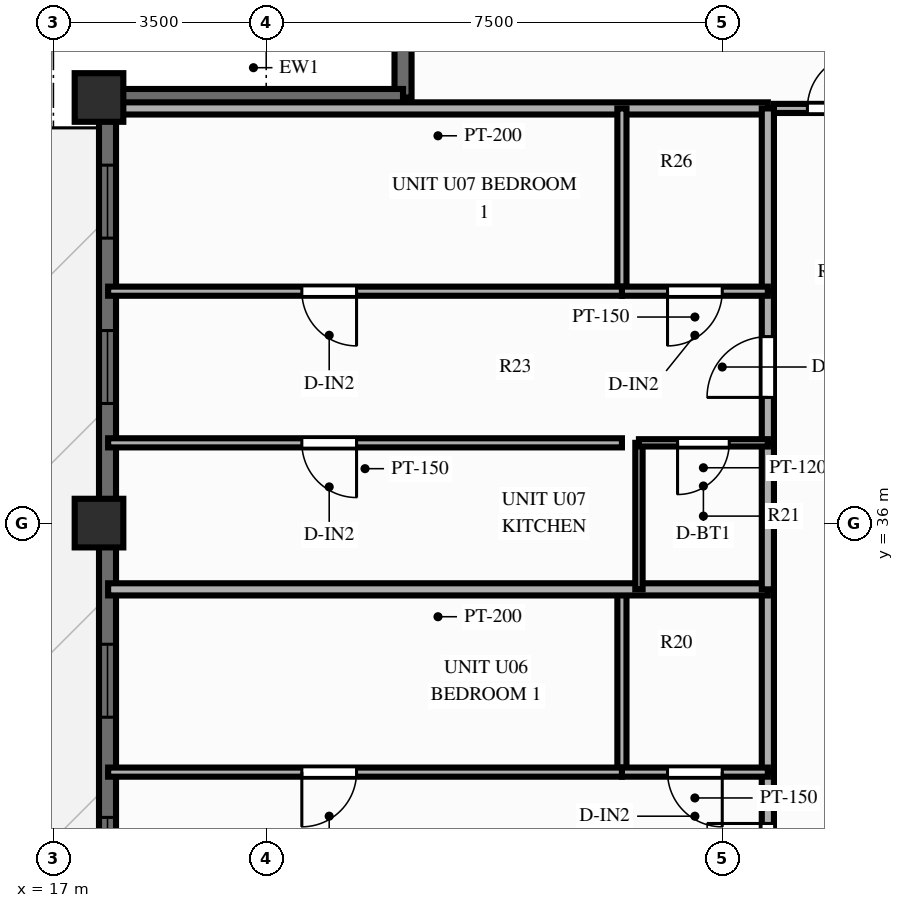
"""IFC4 building model, lengths in metres.
Left out: names, types, materials, properties, quantities, classifications, styles, units other than length and angle.
Written with IfcOpenShell. Run it as: python <this file> out.ifc"""

import sys

from ifc_helpers import new_model, si_unit, direction, frame, frame_2d, origin, origin_2d, place, context, subcontext, project, spatial, rectangle, extrude, source, transform, mapped, element, fill, save


model = new_model("IFC4")
c1 = context("Model", 3, precision=1e-05, world=origin(), true_north=direction((0.0, 1.0)))
c2 = subcontext(c1, "Body", "Model", "MODEL_VIEW")
j1 = project(units=[si_unit("LENGTHUNIT", "METRE"), si_unit("PLANEANGLEUNIT", "RADIAN")], contexts=[c1])
p1 = place(None, origin())
s1 = spatial("IfcSite", under=j1, at=p1, CompositionType="ELEMENT")
p2 = place(p1, origin())
s2 = spatial("IfcBuilding", under=s1, at=p2, CompositionType="ELEMENT")
p3 = place(p2, frame((0.0, 0.0, 192.7)))
s3 = spatial("IfcBuildingStorey", under=s2, at=p3, CompositionType="ELEMENT", Elevation=192.7)
m1 = source(origin(), c2, "Body", "SweptSolid", [
    extrude(rectangle(XDim=0.8, YDim=0.8, at=origin_2d()), origin(), (0.0, 0.0, 1.0), 3.9),
])
for number, where, z_axis, x_axis in (
    (1, (17.75, 43.0, 0.0), (0.0, 0.0, 1.0), (1.0, 0.0, 0.0)),
    (2, (17.75, 36.0, 0.0), (0.0, 0.0, 1.0), (1.0, 0.0, 0.0)),
):
    element("IfcColumn", number, at=place(p3, frame(where, z_axis=z_axis, x_axis=x_axis)), inside=s3, PredefinedType="COLUMN", context=c2, shape_type="MappedRepresentation", body=[
        mapped(m1, transform((0.0, 0.0, 0.0), scale=1.0)),
    ])
p4 = place(p3, frame((17.89, 11.0, 0.0), z_axis=(0.0, 0.0, 1.0), x_axis=(0.0, 1.0, 0.0)))
e3 = element("IfcWall", 3, at=p4, inside=s3, PredefinedType="SOLIDWALL", context=c2, shape_type="SweptSolid", body=[
    extrude(rectangle(XDim=32.0, YDim=0.28, at=frame_2d((16.0, 0.0))), origin(), (0.0, 0.0, 1.0), 2.44),
])
p5 = place(p4, frame((0.717, 0.0, 0.25)))
e4 = element("IfcOpeningElement", 4, at=p5, cuts=e3, PredefinedType="OPENING", context=c2, shape_type="SweptSolid", body=[
    extrude(rectangle(XDim=1.2, YDim=1.5, at=frame_2d((0.6, 0.75))), frame((0.0, 0.152, 0.0), z_axis=(0.0, -1.0, 0.0), x_axis=(1.0, 0.0, 0.0)), (0.0, 0.0, 1.0), 0.304),
])
p6 = place(p4, frame((3.139, 0.0, 0.25)))
e5 = element("IfcOpeningElement", 5, at=p6, cuts=e3, PredefinedType="OPENING", context=c2, shape_type="SweptSolid", body=[
    extrude(rectangle(XDim=1.2, YDim=1.5, at=frame_2d((0.6, 0.75))), frame((0.0, 0.152, 0.0), z_axis=(0.0, -1.0, 0.0), x_axis=(1.0, 0.0, 0.0)), (0.0, 0.0, 1.0), 0.304),
])
p7 = place(p4, frame((5.447, 0.0, 0.25)))
e6 = element("IfcOpeningElement", 6, at=p7, cuts=e3, PredefinedType="OPENING", context=c2, shape_type="SweptSolid", body=[
    extrude(rectangle(XDim=0.95, YDim=1.5, at=frame_2d((0.475, 0.75))), frame((0.0, 0.152, 0.0), z_axis=(0.0, -1.0, 0.0), x_axis=(1.0, 0.0, 0.0)), (0.0, 0.0, 1.0), 0.304),
])
p8 = place(p4, frame((8.597, 0.0, 0.25)))
e7 = element("IfcOpeningElement", 7, at=p8, cuts=e3, PredefinedType="OPENING", context=c2, shape_type="SweptSolid", body=[
    extrude(rectangle(XDim=1.2, YDim=1.5, at=frame_2d((0.6, 0.75))), frame((0.0, 0.152, 0.0), z_axis=(0.0, -1.0, 0.0), x_axis=(1.0, 0.0, 0.0)), (0.0, 0.0, 1.0), 0.304),
])
p9 = place(p4, frame((11.05, 0.0, 0.25)))
e8 = element("IfcOpeningElement", 8, at=p9, cuts=e3, PredefinedType="OPENING", context=c2, shape_type="SweptSolid", body=[
    extrude(rectangle(XDim=1.2, YDim=1.5, at=frame_2d((0.6, 0.75))), frame((0.0, 0.152, 0.0), z_axis=(0.0, -1.0, 0.0), x_axis=(1.0, 0.0, 0.0)), (0.0, 0.0, 1.0), 0.304),
])
p10 = place(p4, frame((13.697, 0.0, 0.0)))
e9 = element("IfcOpeningElement", 9, at=p10, cuts=e3, PredefinedType="OPENING", context=c2, shape_type="SweptSolid", body=[
    extrude(rectangle(XDim=1.6, YDim=2.15, at=frame_2d((0.8, 1.075))), frame((0.0, 0.152, 0.0), z_axis=(0.0, -1.0, 0.0), x_axis=(1.0, 0.0, 0.0)), (0.0, 0.0, 1.0), 0.304),
])
p11 = place(p4, frame((16.507, 0.0, 0.25)))
e10 = element("IfcOpeningElement", 10, at=p11, cuts=e3, PredefinedType="OPENING", context=c2, shape_type="SweptSolid", body=[
    extrude(rectangle(XDim=1.2, YDim=1.5, at=frame_2d((0.6, 0.75))), frame((0.0, 0.152, 0.0), z_axis=(0.0, -1.0, 0.0), x_axis=(1.0, 0.0, 0.0)), (0.0, 0.0, 1.0), 0.304),
])
p12 = place(p4, frame((18.959, 0.0, 0.25)))
e11 = element("IfcOpeningElement", 11, at=p12, cuts=e3, PredefinedType="OPENING", context=c2, shape_type="SweptSolid", body=[
    extrude(rectangle(XDim=1.2, YDim=1.5, at=frame_2d((0.6, 0.75))), frame((0.0, 0.152, 0.0), z_axis=(0.0, -1.0, 0.0), x_axis=(1.0, 0.0, 0.0)), (0.0, 0.0, 1.0), 0.304),
])
p13 = place(p4, frame((21.807, 0.0, 0.25)))
e12 = element("IfcOpeningElement", 12, at=p13, cuts=e3, PredefinedType="OPENING", context=c2, shape_type="SweptSolid", body=[
    extrude(rectangle(XDim=1.2, YDim=1.5, at=frame_2d((0.6, 0.75))), frame((0.0, 0.152, 0.0), z_axis=(0.0, -1.0, 0.0), x_axis=(1.0, 0.0, 0.0)), (0.0, 0.0, 1.0), 0.304),
])
p14 = place(p4, frame((26.967, 0.0, 0.25)))
e13 = element("IfcOpeningElement", 13, at=p14, cuts=e3, PredefinedType="OPENING", context=c2, shape_type="SweptSolid", body=[
    extrude(rectangle(XDim=1.2, YDim=1.5, at=frame_2d((0.6, 0.75))), frame((0.0, 0.152, 0.0), z_axis=(0.0, -1.0, 0.0), x_axis=(1.0, 0.0, 0.0)), (0.0, 0.0, 1.0), 0.304),
])
p15 = place(p4, frame((29.687, 0.0, 0.25)))
e14 = element("IfcOpeningElement", 14, at=p15, cuts=e3, PredefinedType="OPENING", context=c2, shape_type="SweptSolid", body=[
    extrude(rectangle(XDim=1.2, YDim=1.5, at=frame_2d((0.6, 0.75))), frame((0.0, 0.152, 0.0), z_axis=(0.0, -1.0, 0.0), x_axis=(1.0, 0.0, 0.0)), (0.0, 0.0, 1.0), 0.304),
])
for number, where, z_axis, x_axis in (
    (15, (22.75, 43.0, 0.0), (0.0, 0.0, 1.0), (0.0, 1.0, 0.0)),
    (16, (17.83, 43.0, 0.0), (0.0, 0.0, 1.0), (1.0, 0.0, 0.0)),
):
    element("IfcWall", number, at=place(p3, frame(where, z_axis=z_axis, x_axis=x_axis)), inside=s3, PredefinedType="SOLIDWALL", context=c2, shape_type="SweptSolid", body=[
        extrude(rectangle(XDim=4.92, YDim=0.28, at=frame_2d((2.46, 0.0))), origin(), (0.0, 0.0, 1.0), 2.44),
    ])
p16 = place(p3, frame((28.85, 42.82, 0.0), z_axis=(0.0, 0.0, 1.0), x_axis=(1.0, 0.0, 0.0)))
e17 = element("IfcWall", 17, at=p16, inside=s3, PredefinedType="PARTITIONING", context=c2, shape_type="SweptSolid", body=[
    extrude(rectangle(XDim=2.33, YDim=0.15, at=frame_2d((1.165, 0.0))), origin(), (0.0, 0.0, 1.0), 2.24),
])
p17 = place(p16, frame((0.55, 0.0, 0.0)))
e18 = element("IfcOpeningElement", 18, at=p17, cuts=e17, PredefinedType="OPENING", context=c2, shape_type="SweptSolid", body=[
    extrude(rectangle(XDim=0.9, YDim=2.1, at=frame_2d((0.45, 1.05))), frame((0.0, 0.087, 0.0), z_axis=(0.0, -1.0, 0.0), x_axis=(1.0, 0.0, 0.0)), (0.0, 0.0, 1.0), 0.174),
])
p18 = place(p3, frame((28.75, 42.82, 0.0), z_axis=(0.0, 0.0, 1.0), x_axis=(-1.0, 0.0, 0.0)))
e19 = element("IfcWall", 19, at=p18, inside=s3, PredefinedType="PARTITIONING", context=c2, shape_type="SweptSolid", body=[
    extrude(rectangle(XDim=10.85, YDim=0.2, at=frame_2d((5.425, 0.0))), origin(), (0.0, 0.0, 1.0), 2.24),
])
p19 = place(p3, frame((28.75, 29.215, 0.0), z_axis=(0.0, 0.0, 1.0), x_axis=(0.0, 1.0, 0.0)))
e20 = element("IfcWall", 20, at=p19, inside=s3, PredefinedType="PARTITIONING", context=c2, shape_type="SweptSolid", body=[
    extrude(rectangle(XDim=2.689, YDim=0.2, at=frame_2d((1.345, 0.0))), origin(), (0.0, 0.0, 1.0), 3.56),
])
p20 = place(p19, frame((0.845, 0.0, 0.0)))
e21 = element("IfcOpeningElement", 21, at=p20, cuts=e20, PredefinedType="OPENING", context=c2, shape_type="SweptSolid", body=[
    extrude(rectangle(XDim=1.0, YDim=2.15, at=frame_2d((0.5, 1.075))), frame((0.0, 0.112, 0.0), z_axis=(0.0, -1.0, 0.0), x_axis=(1.0, 0.0, 0.0)), (0.0, 0.0, 1.0), 0.224),
])
p21 = place(p3, frame((28.75, 31.904, 0.0), z_axis=(0.0, 0.0, 1.0), x_axis=(0.0, 1.0, 0.0)))
e22 = element("IfcWall", 22, at=p21, inside=s3, PredefinedType="PARTITIONING", context=c2, shape_type="SweptSolid", body=[
    extrude(rectangle(XDim=3.006, YDim=0.2, at=frame_2d((1.503, 0.0))), origin(), (0.0, 0.0, 1.0), 3.56),
])
p22 = place(p3, frame((26.35, 31.904, 0.0), z_axis=(0.0, 0.0, 1.0), x_axis=(0.0, 1.0, 0.0)))
e23 = element("IfcWall", 23, at=p22, inside=s3, PredefinedType="PARTITIONING", context=c2, shape_type="SweptSolid", body=[
    extrude(rectangle(XDim=3.006, YDim=0.15, at=frame_2d((1.503, 0.0))), origin(), (0.0, 0.0, 1.0), 3.56),
])
p23 = place(p3, frame((28.75, 31.904, 0.0), z_axis=(0.0, 0.0, 1.0), x_axis=(-1.0, 0.0, 0.0)))
e24 = element("IfcWall", 24, at=p23, inside=s3, PredefinedType="PARTITIONING", context=c2, shape_type="SweptSolid", body=[
    extrude(rectangle(XDim=2.4, YDim=0.15, at=frame_2d((1.2, 0.0))), origin(), (0.0, 0.0, 1.0), 3.29),
])
p24 = place(p23, frame((0.75, 0.0, 0.0)))
e25 = element("IfcOpeningElement", 25, at=p24, cuts=e24, PredefinedType="OPENING", context=c2, shape_type="SweptSolid", body=[
    extrude(rectangle(XDim=0.9, YDim=2.1, at=frame_2d((0.45, 1.05))), frame((0.0, 0.087, 0.0), z_axis=(0.0, -1.0, 0.0), x_axis=(1.0, 0.0, 0.0)), (0.0, 0.0, 1.0), 0.174),
])
p25 = place(p3, frame((26.35, 31.904, 0.0), z_axis=(0.0, 0.0, 1.0), x_axis=(-1.0, 0.0, 0.0)))
e26 = element("IfcWall", 26, at=p25, inside=s3, PredefinedType="PARTITIONING", context=c2, shape_type="SweptSolid", body=[
    extrude(rectangle(XDim=8.45, YDim=0.15, at=frame_2d((4.225, 0.0))), origin(), (0.0, 0.0, 1.0), 3.29),
])
p26 = place(p25, frame((4.364, 0.0, 0.0)))
e27 = element("IfcOpeningElement", 27, at=p26, cuts=e26, PredefinedType="OPENING", context=c2, shape_type="SweptSolid", body=[
    extrude(rectangle(XDim=0.9, YDim=2.1, at=frame_2d((0.45, 1.05))), frame((0.0, 0.087, 0.0), z_axis=(0.0, -1.0, 0.0), x_axis=(1.0, 0.0, 0.0)), (0.0, 0.0, 1.0), 0.174),
])
p27 = place(p3, frame((28.75, 34.91, 0.0), z_axis=(0.0, 0.0, 1.0), x_axis=(-1.0, 0.0, 0.0)))
e28 = element("IfcWall", 28, at=p27, inside=s3, PredefinedType="PARTITIONING", context=c2, shape_type="SweptSolid", body=[
    extrude(rectangle(XDim=10.85, YDim=0.2, at=frame_2d((5.425, 0.0))), origin(), (0.0, 0.0, 1.0), 3.56),
])
p28 = place(p3, frame((28.75, 34.91, 0.0), z_axis=(0.0, 0.0, 1.0), x_axis=(0.0, 1.0, 0.0)))
e29 = element("IfcWall", 29, at=p28, inside=s3, PredefinedType="PARTITIONING", context=c2, shape_type="SweptSolid", body=[
    extrude(rectangle(XDim=2.41, YDim=0.2, at=frame_2d((1.205, 0.0))), origin(), (0.0, 0.0, 1.0), 3.56),
])
p29 = place(p3, frame((28.75, 37.32, 0.0), z_axis=(0.0, 0.0, 1.0), x_axis=(0.0, 1.0, 0.0)))
e30 = element("IfcWall", 30, at=p29, inside=s3, PredefinedType="PARTITIONING", context=c2, shape_type="SweptSolid", body=[
    extrude(rectangle(XDim=2.494, YDim=0.2, at=frame_2d((1.247, 0.0))), origin(), (0.0, 0.0, 1.0), 3.56),
])
p30 = place(p29, frame((0.747, 0.0, 0.0)))
e31 = element("IfcOpeningElement", 31, at=p30, cuts=e30, PredefinedType="OPENING", context=c2, shape_type="SweptSolid", body=[
    extrude(rectangle(XDim=1.0, YDim=2.15, at=frame_2d((0.5, 1.075))), frame((0.0, 0.112, 0.0), z_axis=(0.0, -1.0, 0.0), x_axis=(1.0, 0.0, 0.0)), (0.0, 0.0, 1.0), 0.224),
])
p31 = place(p3, frame((28.75, 39.814, 0.0), z_axis=(0.0, 0.0, 1.0), x_axis=(0.0, 1.0, 0.0)))
e32 = element("IfcWall", 32, at=p31, inside=s3, PredefinedType="PARTITIONING", context=c2, shape_type="SweptSolid", body=[
    extrude(rectangle(XDim=3.006, YDim=0.2, at=frame_2d((1.503, 0.0))), origin(), (0.0, 0.0, 1.0), 3.56),
])
p32 = place(p3, frame((26.63, 34.91, 0.0), z_axis=(0.0, 0.0, 1.0), x_axis=(0.0, 1.0, 0.0)))
e33 = element("IfcWall", 33, at=p32, inside=s3, PredefinedType="PARTITIONING", context=c2, shape_type="SweptSolid", body=[
    extrude(rectangle(XDim=2.41, YDim=0.12, at=frame_2d((1.205, 0.0))), origin(), (0.0, 0.0, 1.0), 3.56),
])
p33 = place(p3, frame((26.35, 39.814, 0.0), z_axis=(0.0, 0.0, 1.0), x_axis=(0.0, 1.0, 0.0)))
e34 = element("IfcWall", 34, at=p33, inside=s3, PredefinedType="PARTITIONING", context=c2, shape_type="SweptSolid", body=[
    extrude(rectangle(XDim=3.006, YDim=0.15, at=frame_2d((1.503, 0.0))), origin(), (0.0, 0.0, 1.0), 3.56),
])
p34 = place(p3, frame((28.75, 37.32, 0.0), z_axis=(0.0, 0.0, 1.0), x_axis=(-1.0, 0.0, 0.0)))
e35 = element("IfcWall", 35, at=p34, inside=s3, PredefinedType="PARTITIONING", context=c2, shape_type="SweptSolid", body=[
    extrude(rectangle(XDim=2.12, YDim=0.12, at=frame_2d((1.06, 0.0))), origin(), (0.0, 0.0, 1.0), 3.56),
])
p35 = place(p34, frame((0.635, 0.0, 0.0)))
e36 = element("IfcOpeningElement", 36, at=p35, cuts=e35, PredefinedType="OPENING", context=c2, shape_type="SweptSolid", body=[
    extrude(rectangle(XDim=0.85, YDim=2.05, at=frame_2d((0.425, 1.025))), frame((0.0, 0.072, 0.0), z_axis=(0.0, -1.0, 0.0), x_axis=(1.0, 0.0, 0.0)), (0.0, 0.0, 1.0), 0.144),
])
p36 = place(p3, frame((26.35, 37.32, 0.0), z_axis=(0.0, 0.0, 1.0), x_axis=(-1.0, 0.0, 0.0)))
e37 = element("IfcWall", 37, at=p36, inside=s3, PredefinedType="PARTITIONING", context=c2, shape_type="SweptSolid", body=[
    extrude(rectangle(XDim=8.45, YDim=0.15, at=frame_2d((4.225, 0.0))), origin(), (0.0, 0.0, 1.0), 3.56),
])
p37 = place(p36, frame((4.364, 0.0, 0.0)))
e38 = element("IfcOpeningElement", 38, at=p37, cuts=e37, PredefinedType="OPENING", context=c2, shape_type="SweptSolid", body=[
    extrude(rectangle(XDim=0.9, YDim=2.1, at=frame_2d((0.45, 1.05))), frame((0.0, 0.087, 0.0), z_axis=(0.0, -1.0, 0.0), x_axis=(1.0, 0.0, 0.0)), (0.0, 0.0, 1.0), 0.174),
])
p38 = place(p3, frame((28.75, 39.814, 0.0), z_axis=(0.0, 0.0, 1.0), x_axis=(-1.0, 0.0, 0.0)))
e39 = element("IfcWall", 39, at=p38, inside=s3, PredefinedType="PARTITIONING", context=c2, shape_type="SweptSolid", body=[
    extrude(rectangle(XDim=2.4, YDim=0.15, at=frame_2d((1.2, 0.0))), origin(), (0.0, 0.0, 1.0), 3.56),
])
p39 = place(p38, frame((0.75, 0.0, 0.0)))
e40 = element("IfcOpeningElement", 40, at=p39, cuts=e39, PredefinedType="OPENING", context=c2, shape_type="SweptSolid", body=[
    extrude(rectangle(XDim=0.9, YDim=2.1, at=frame_2d((0.45, 1.05))), frame((0.0, 0.087, 0.0), z_axis=(0.0, -1.0, 0.0), x_axis=(1.0, 0.0, 0.0)), (0.0, 0.0, 1.0), 0.174),
])
p40 = place(p3, frame((26.35, 39.814, 0.0), z_axis=(0.0, 0.0, 1.0), x_axis=(-1.0, 0.0, 0.0)))
e41 = element("IfcWall", 41, at=p40, inside=s3, PredefinedType="PARTITIONING", context=c2, shape_type="SweptSolid", body=[
    extrude(rectangle(XDim=8.45, YDim=0.15, at=frame_2d((4.225, 0.0))), origin(), (0.0, 0.0, 1.0), 3.56),
])
p41 = place(p40, frame((4.364, 0.0, 0.0)))
e42 = element("IfcOpeningElement", 42, at=p41, cuts=e41, PredefinedType="OPENING", context=c2, shape_type="SweptSolid", body=[
    extrude(rectangle(XDim=0.9, YDim=2.1, at=frame_2d((0.45, 1.05))), frame((0.0, 0.087, 0.0), z_axis=(0.0, -1.0, 0.0), x_axis=(1.0, 0.0, 0.0)), (0.0, 0.0, 1.0), 0.174),
])
m2 = source(origin(), c2, "Body", "SweptSolid", [
    extrude(rectangle(XDim=1.2, YDim=1.5, at=frame_2d((0.6, 0.75))), frame((0.0, 0.03, 0.0), z_axis=(0.0, -1.0, 0.0), x_axis=(1.0, 0.0, 0.0)), (0.0, 0.0, 1.0), 0.06),
])
p42 = place(p12, origin())
e43 = element("IfcWindow", 43, at=p42, inside=s3, PartitioningType="SINGLE_PANEL", PredefinedType="WINDOW", context=c2, shape_type="MappedRepresentation", body=[
    mapped(m2, transform((0.0, 0.0, 0.0), scale=1.0)),
])
fill(e11, e43)
p43 = place(p13, origin())
e44 = element("IfcWindow", 44, at=p43, inside=s3, PartitioningType="SINGLE_PANEL", PredefinedType="WINDOW", context=c2, shape_type="MappedRepresentation", body=[
    mapped(m2, transform((0.0, 0.0, 0.0), scale=1.0)),
])
fill(e12, e44)
p44 = place(p14, origin())
e45 = element("IfcWindow", 45, at=p44, inside=s3, PartitioningType="SINGLE_PANEL", PredefinedType="WINDOW", context=c2, shape_type="MappedRepresentation", body=[
    mapped(m2, transform((0.0, 0.0, 0.0), scale=1.0)),
])
fill(e13, e45)
p45 = place(p15, origin())
e46 = element("IfcWindow", 46, at=p45, inside=s3, PartitioningType="SINGLE_PANEL", PredefinedType="WINDOW", context=c2, shape_type="MappedRepresentation", body=[
    mapped(m2, transform((0.0, 0.0, 0.0), scale=1.0)),
])
fill(e14, e46)
m3 = source(origin(), c2, "Body", "SweptSolid", [
    extrude(rectangle(XDim=0.9, YDim=2.1, at=frame_2d((0.45, 1.05))), frame((0.0, 0.025, 0.0), z_axis=(0.0, -1.0, 0.0), x_axis=(1.0, 0.0, 0.0)), (0.0, 0.0, 1.0), 0.05),
])
p46 = place(p17, origin())
e47 = element("IfcDoor", 47, at=p46, inside=s3, OperationType="SINGLE_SWING_RIGHT", PredefinedType="DOOR", context=c2, shape_type="MappedRepresentation", body=[
    mapped(m3, transform((0.0, 0.0, 0.0), scale=1.0)),
])
fill(e18, e47)
m4 = source(origin(), c2, "Body", "SweptSolid", [
    extrude(rectangle(XDim=1.0, YDim=2.15, at=frame_2d((0.5, 1.075))), frame((0.0, 0.025, 0.0), z_axis=(0.0, -1.0, 0.0), x_axis=(1.0, 0.0, 0.0)), (0.0, 0.0, 1.0), 0.05),
])
p47 = place(p20, origin())
e48 = element("IfcDoor", 48, at=p47, inside=s3, OperationType="SINGLE_SWING_RIGHT", PredefinedType="DOOR", context=c2, shape_type="MappedRepresentation", body=[
    mapped(m4, transform((0.0, 0.0, 0.0), scale=1.0)),
])
fill(e21, e48)
p48 = place(p24, origin())
e49 = element("IfcDoor", 49, at=p48, inside=s3, OperationType="SINGLE_SWING_LEFT", PredefinedType="DOOR", context=c2, shape_type="MappedRepresentation", body=[
    mapped(m3, transform((0.0, 0.0, 0.0), scale=1.0)),
])
fill(e25, e49)
p49 = place(p26, origin())
e50 = element("IfcDoor", 50, at=p49, inside=s3, OperationType="SINGLE_SWING_RIGHT", PredefinedType="DOOR", context=c2, shape_type="MappedRepresentation", body=[
    mapped(m3, transform((0.0, 0.0, 0.0), scale=1.0)),
])
fill(e27, e50)
p50 = place(p30, origin())
e51 = element("IfcDoor", 51, at=p50, inside=s3, OperationType="SINGLE_SWING_LEFT", PredefinedType="DOOR", context=c2, shape_type="MappedRepresentation", body=[
    mapped(m4, transform((0.0, 0.0, 0.0), scale=1.0)),
])
fill(e31, e51)
m5 = source(origin(), c2, "Body", "SweptSolid", [
    extrude(rectangle(XDim=0.85, YDim=2.05, at=frame_2d((0.425, 1.025))), frame((0.0, 0.025, 0.0), z_axis=(0.0, -1.0, 0.0), x_axis=(1.0, 0.0, 0.0)), (0.0, 0.0, 1.0), 0.05),
])
p51 = place(p35, origin())
e52 = element("IfcDoor", 52, at=p51, inside=s3, OperationType="SINGLE_SWING_RIGHT", PredefinedType="DOOR", context=c2, shape_type="MappedRepresentation", body=[
    mapped(m5, transform((0.0, 0.0, 0.0), scale=1.0)),
])
fill(e36, e52)
p52 = place(p37, origin())
e53 = element("IfcDoor", 53, at=p52, inside=s3, OperationType="SINGLE_SWING_LEFT", PredefinedType="DOOR", context=c2, shape_type="MappedRepresentation", body=[
    mapped(m3, transform((0.0, 0.0, 0.0), scale=1.0)),
])
fill(e38, e53)
p53 = place(p39, origin())
e54 = element("IfcDoor", 54, at=p53, inside=s3, OperationType="SINGLE_SWING_RIGHT", PredefinedType="DOOR", context=c2, shape_type="MappedRepresentation", body=[
    mapped(m3, transform((0.0, 0.0, 0.0), scale=1.0)),
])
fill(e40, e54)
p54 = place(p41, origin())
e55 = element("IfcDoor", 55, at=p54, inside=s3, OperationType="SINGLE_SWING_LEFT", PredefinedType="DOOR", context=c2, shape_type="MappedRepresentation", body=[
    mapped(m3, transform((0.0, 0.0, 0.0), scale=1.0)),
])
fill(e42, e55)
save(model, sys.argv[1])
